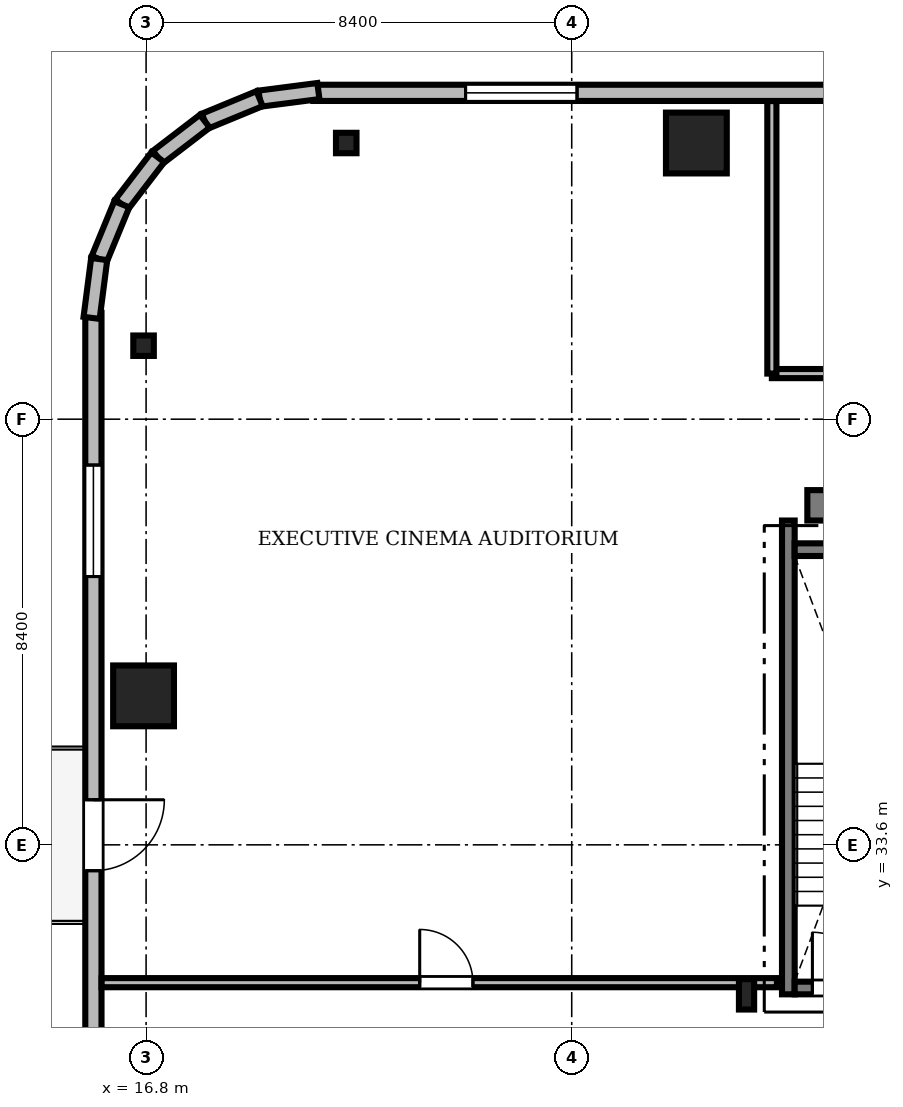
"""IFC4 building model, lengths in metres.
Left out: names, types, materials, properties, quantities, classifications, styles, units other than length and angle.
Written with IfcOpenShell. Run it as: python <this file> out.ifc"""

import sys

from ifc_helpers import new_model, si_unit, direction, frame, frame_2d, origin, origin_2d, place, context, subcontext, project, spatial, rectangle, i_section, extrude, source, transform, mapped, element, fill, save


model = new_model("IFC4")
c1 = context("Model", 3, precision=1e-05, world=origin(), true_north=direction((0.0, 1.0)))
c2 = subcontext(c1, "Body", "Model", "MODEL_VIEW")
j1 = project(units=[si_unit("LENGTHUNIT", "METRE"), si_unit("PLANEANGLEUNIT", "RADIAN")], contexts=[c1])
p1 = place(None, origin())
s1 = spatial("IfcSite", under=j1, at=p1, CompositionType="ELEMENT")
p2 = place(p1, origin())
s2 = spatial("IfcBuilding", under=s1, at=p2, CompositionType="ELEMENT")
p3 = place(p2, frame((0.0, 0.0, 246.65)))
s3 = spatial("IfcBuildingStorey", under=s2, at=p3, CompositionType="ELEMENT", Elevation=246.65)
m1 = source(origin(), c2, "Body", "SweptSolid", [
    extrude(rectangle(XDim=17.52, YDim=0.6, at=frame_2d((8.76, 0.0))), origin(), (0.0, 0.0, 1.0), 3.73),
])
p4 = place(p3, frame((29.85, 40.3, 0.0), z_axis=(0.0, 0.0, 1.0), x_axis=(1.0, 0.0, 0.0)))
e1 = element("IfcWall", 1, at=p4, inside=s3, PredefinedType="SHEAR", context=c2, shape_type="MappedRepresentation", body=[
    mapped(m1, transform((0.0, 0.0, 0.0), scale=1.0)),
])
m2 = source(origin(), c2, "Body", "SweptSolid", [
    extrude(i_section(OverallWidth=0.3, OverallDepth=0.6, WebThickness=0.015, FlangeThickness=0.03, FilletRadius=0.027, at=origin_2d()), origin(), (0.0, 0.0, 1.0), 3.73),
])
p5 = place(p3, frame((28.65, 30.65, 0.0), z_axis=(0.0, 0.0, 1.0), x_axis=(1.0, 0.0, 0.0)))
e2 = element("IfcColumn", 2, at=p5, inside=s3, PredefinedType="COLUMN", context=c2, shape_type="MappedRepresentation", body=[
    mapped(m2, transform((0.0, 0.0, 0.0), scale=1.0)),
])
m3 = source(origin(), c2, "Body", "SweptSolid", [
    extrude(rectangle(XDim=1.2, YDim=1.2, at=origin_2d()), origin(), (0.0, 0.0, 1.0), 3.73),
])
for number, where, z_axis, x_axis in (
    (3, (27.66, 47.45, 0.0), (0.0, 0.0, 1.0), (1.0, 0.0, 0.0)),
    (4, (16.75, 36.54, 0.0), (0.0, 0.0, 1.0), (1.0, 0.0, 0.0)),
):
    element("IfcColumn", number, at=place(p3, frame(where, z_axis=z_axis, x_axis=x_axis)), inside=s3, PredefinedType="COLUMN", context=c2, shape_type="MappedRepresentation", body=[
        mapped(m3, transform((0.0, 0.0, 0.0), scale=1.0)),
    ])
m4 = source(origin(), c2, "Body", "SweptSolid", [
    extrude(i_section(OverallWidth=0.405, OverallDepth=0.403, WebThickness=0.018, FlangeThickness=0.028, FilletRadius=0.015, at=origin_2d()), origin(), (0.0, 0.0, 1.0), 3.73),
])
for number, where, z_axis, x_axis in (
    (5, (20.75, 47.45, 0.0), (0.0, 0.0, 1.0), (1.0, 0.0, 0.0)),
    (6, (16.75, 43.45, 0.0), (0.0, 0.0, 1.0), (1.0, 0.0, 0.0)),
):
    element("IfcColumn", number, at=place(p3, frame(where, z_axis=z_axis, x_axis=x_axis)), inside=s3, PredefinedType="COLUMN", context=c2, shape_type="MappedRepresentation", body=[
        mapped(m4, transform((0.0, 0.0, 0.0), scale=1.0)),
    ])
m5 = source(origin(), c2, "Body", "SweptSolid", [
    extrude(rectangle(XDim=15.6, YDim=0.32, at=frame_2d((7.8, 0.0))), origin(), (0.0, 0.0, 1.0), 3.73),
])
p6 = place(p3, frame((35.7, 48.44, 0.0), z_axis=(0.0, 0.0, 1.0), x_axis=(-1.0, 0.0, 0.0)))
e7 = element("IfcWall", 7, at=p6, inside=s3, PredefinedType="SOLIDWALL", context=c2, shape_type="MappedRepresentation", body=[
    mapped(m5, transform((0.0, 0.0, 0.0), scale=1.0)),
])
m6 = source(origin(), c2, "Body", "SweptSolid", [
    extrude(rectangle(XDim=2.2, YDim=2.4, at=frame_2d((1.1, 1.2))), frame((0.0, 0.17, 0.0), z_axis=(0.0, -1.0, 0.0), x_axis=(1.0, 0.0, 0.0)), (0.0, 0.0, 1.0), 0.34),
])
p7 = place(p6, frame((10.395, 0.0, 0.72)))
e8 = element("IfcOpeningElement", 8, at=p7, cuts=e7, PredefinedType="OPENING", context=c2, shape_type="MappedRepresentation", body=[
    mapped(m6, transform((0.0, 0.0, 0.0), scale=1.0)),
])
m7 = source(origin(), c2, "Body", "SweptSolid", [
    extrude(rectangle(XDim=15.6, YDim=0.32, at=frame_2d((7.8, 0.0))), origin(), (0.0, 0.0, 1.0), 3.73),
])
p8 = place(p3, frame((15.76, 44.1, 0.0), z_axis=(0.0, 0.0, 1.0), x_axis=(0.0, -1.0, 0.0)))
e9 = element("IfcWall", 9, at=p8, inside=s3, PredefinedType="SOLIDWALL", context=c2, shape_type="MappedRepresentation", body=[
    mapped(m7, transform((0.0, 0.0, 0.0), scale=1.0)),
])
m8 = source(origin(), c2, "Body", "SweptSolid", [
    extrude(rectangle(XDim=1.4, YDim=2.3, at=frame_2d((0.7, 1.15))), frame((0.0, 0.17, 0.0), z_axis=(0.0, -1.0, 0.0), x_axis=(1.0, 0.0, 0.0)), (0.0, 0.0, 1.0), 0.34),
])
p9 = place(p8, frame((9.61, 0.0, 0.0)))
e10 = element("IfcOpeningElement", 10, at=p9, cuts=e9, PredefinedType="OPENING", context=c2, shape_type="MappedRepresentation", body=[
    mapped(m8, transform((0.0, 0.0, 0.0), scale=1.0)),
])
p10 = place(p8, frame((3.005, 0.0, 0.72)))
e11 = element("IfcOpeningElement", 11, at=p10, cuts=e9, PredefinedType="OPENING", context=c2, shape_type="MappedRepresentation", body=[
    mapped(m6, transform((0.0, 0.0, 0.0), scale=1.0)),
])
m9 = source(origin(), c2, "Body", "SweptSolid", [
    extrude(rectangle(XDim=1.17, YDim=0.32, at=frame_2d((0.585, 0.0))), origin(), (0.0, 0.0, 1.0), 3.73),
])
p11 = place(p3, frame((20.2, 48.476, 0.0), z_axis=(0.0, 0.0, 1.0), x_axis=(-0.991735963317, -0.128295670475, 0.0)))
e12 = element("IfcWall", 12, at=p11, inside=s3, PredefinedType="SOLIDWALL", context=c2, shape_type="MappedRepresentation", body=[
    mapped(m9, transform((0.0, 0.0, 0.0), scale=1.0)),
])
m10 = source(origin(), c2, "Body", "SweptSolid", [
    extrude(rectangle(XDim=1.169, YDim=0.32, at=frame_2d((0.584, 0.0))), origin(), (0.0, 0.0, 1.0), 3.73),
])
p12 = place(p3, frame((19.04, 48.325, 0.0), z_axis=(0.0, 0.0, 1.0), x_axis=(-0.924552646638, -0.381054331552, 0.0)))
e13 = element("IfcWall", 13, at=p12, inside=s3, PredefinedType="SOLIDWALL", context=c2, shape_type="MappedRepresentation", body=[
    mapped(m10, transform((0.0, 0.0, 0.0), scale=1.0)),
])
m11 = source(origin(), c2, "Body", "SweptSolid", [
    extrude(rectangle(XDim=1.169, YDim=0.32, at=frame_2d((0.584, 0.0))), origin(), (0.0, 0.0, 1.0), 3.73),
])
p13 = place(p3, frame((17.959, 47.88, 0.0), z_axis=(0.0, 0.0, 1.0), x_axis=(-0.793663520347, -0.608356981114, 0.0)))
e14 = element("IfcWall", 14, at=p13, inside=s3, PredefinedType="SOLIDWALL", context=c2, shape_type="MappedRepresentation", body=[
    mapped(m11, transform((0.0, 0.0, 0.0), scale=1.0)),
])
m12 = source(origin(), c2, "Body", "SweptSolid", [
    extrude(rectangle(XDim=1.169, YDim=0.32, at=frame_2d((0.584, 0.0))), origin(), (0.0, 0.0, 1.0), 3.73),
])
p14 = place(p3, frame((17.031, 47.169, 0.0), z_axis=(0.0, 0.0, 1.0), x_axis=(-0.608387696831, -0.793639975269, 0.0)))
e15 = element("IfcWall", 15, at=p14, inside=s3, PredefinedType="SOLIDWALL", context=c2, shape_type="MappedRepresentation", body=[
    mapped(m12, transform((0.0, 0.0, 0.0), scale=1.0)),
])
p15 = place(p3, frame((16.32, 46.241, 0.0), z_axis=(0.0, 0.0, 1.0), x_axis=(-0.381054331552, -0.924552646638, 0.0)))
e16 = element("IfcWall", 16, at=p15, inside=s3, PredefinedType="SOLIDWALL", context=c2, shape_type="MappedRepresentation", body=[
    mapped(m10, transform((0.0, 0.0, 0.0), scale=1.0)),
])
p16 = place(p3, frame((15.875, 45.16, 0.0), z_axis=(0.0, 0.0, 1.0), x_axis=(-0.128295670475, -0.991735963317, 0.0)))
e17 = element("IfcWall", 17, at=p16, inside=s3, PredefinedType="SOLIDWALL", context=c2, shape_type="MappedRepresentation", body=[
    mapped(m9, transform((0.0, 0.0, 0.0), scale=1.0)),
])
m13 = source(origin(), c2, "Body", "SweptSolid", [
    extrude(rectangle(XDim=9.35, YDim=0.25, at=frame_2d((4.675, 0.0))), origin(), (0.0, 0.0, 1.0), 3.75),
])
p17 = place(p3, frame((29.475, 30.65, 0.0), z_axis=(0.0, 0.0, 1.0), x_axis=(0.0, 1.0, 0.0)))
e18 = element("IfcWall", 18, at=p17, inside=s3, PredefinedType="SOLIDWALL", context=c2, shape_type="MappedRepresentation", body=[
    mapped(m13, transform((0.0, 0.0, 0.0), scale=1.0)),
])
m14 = source(origin(), c2, "Body", "SweptSolid", [
    extrude(rectangle(XDim=3.15, YDim=0.25, at=frame_2d((1.575, 0.0))), origin(), (0.0, 0.0, 1.0), 3.75),
])
p18 = place(p3, frame((29.6, 39.425, 0.0), z_axis=(0.0, 0.0, 1.0), x_axis=(1.0, 0.0, 0.0)))
e19 = element("IfcWall", 19, at=p18, inside=s3, PredefinedType="SOLIDWALL", context=c2, shape_type="MappedRepresentation", body=[
    mapped(m14, transform((0.0, 0.0, 0.0), scale=1.0)),
])
p19 = place(p3, frame((29.6, 30.775, 0.0), z_axis=(0.0, 0.0, 1.0), x_axis=(1.0, 0.0, 0.0)))
e20 = element("IfcWall", 20, at=p19, inside=s3, PredefinedType="SOLIDWALL", context=c2, shape_type="MappedRepresentation", body=[
    mapped(m14, transform((0.0, 0.0, 0.0), scale=1.0)),
])
m15 = source(origin(), c2, "Body", "SweptSolid", [
    extrude(rectangle(XDim=1.1, YDim=2.2, at=frame_2d((0.55, 1.1))), frame((0.0, 0.135, 0.0), z_axis=(0.0, -1.0, 0.0), x_axis=(1.0, 0.0, 0.0)), (0.0, 0.0, 1.0), 0.27),
])
p20 = place(p19, frame((0.35, 0.0, 0.0)))
e21 = element("IfcOpeningElement", 21, at=p20, cuts=e20, PredefinedType="OPENING", context=c2, shape_type="MappedRepresentation", body=[
    mapped(m15, transform((0.0, 0.0, 0.0), scale=1.0)),
])
m16 = source(origin(), c2, "Body", "SweptSolid", [
    extrude(rectangle(XDim=32.928, YDim=0.18, at=frame_2d((16.464, 0.0))), origin(), (0.0, 0.0, 1.0), 2.972),
])
p21 = place(p3, frame((29.15, 42.9, 0.0), z_axis=(0.0, 0.0, 1.0), x_axis=(1.0, 0.0, 0.0)))
e22 = element("IfcWall", 22, at=p21, inside=s3, PredefinedType="PARTITIONING", context=c2, shape_type="MappedRepresentation", body=[
    mapped(m16, transform((0.0, 0.0, 0.0), scale=1.0)),
])
m17 = source(origin(), c2, "Body", "SweptSolid", [
    extrude(rectangle(XDim=1.05, YDim=2.2, at=frame_2d((0.525, 1.1))), frame((0.0, 0.1, 0.0), z_axis=(0.0, -1.0, 0.0), x_axis=(1.0, 0.0, 0.0)), (0.0, 0.0, 1.0), 0.2),
])
p22 = place(p21, frame((4.5, 0.0, 0.0)))
e23 = element("IfcOpeningElement", 23, at=p22, cuts=e22, PredefinedType="OPENING", context=c2, shape_type="MappedRepresentation", body=[
    mapped(m17, transform((0.0, 0.0, 0.0), scale=1.0)),
])
m18 = source(origin(), c2, "Body", "SweptSolid", [
    extrude(rectangle(XDim=13.328, YDim=0.18, at=frame_2d((6.664, 0.0))), origin(), (0.0, 0.0, 1.0), 2.972),
])
p23 = place(p3, frame((15.922, 30.88, 0.0), z_axis=(0.0, 0.0, 1.0), x_axis=(1.0, 0.0, 0.0)))
e24 = element("IfcWall", 24, at=p23, inside=s3, PredefinedType="PARTITIONING", context=c2, shape_type="MappedRepresentation", body=[
    mapped(m18, transform((0.0, 0.0, 0.0), scale=1.0)),
])
p24 = place(p23, frame((6.278, 0.0, 0.0)))
e25 = element("IfcOpeningElement", 25, at=p24, cuts=e24, PredefinedType="OPENING", context=c2, shape_type="MappedRepresentation", body=[
    mapped(m17, transform((0.0, 0.0, 0.0), scale=1.0)),
])
m19 = source(origin(), c2, "Body", "SweptSolid", [
    extrude(rectangle(XDim=5.378, YDim=0.18, at=frame_2d((2.689, 0.0))), origin(), (0.0, 0.0, 1.0), 2.972),
])
p25 = place(p3, frame((29.15, 42.9, 0.0), z_axis=(0.0, 0.0, 1.0), x_axis=(0.0, 1.0, 0.0)))
e26 = element("IfcWall", 26, at=p25, inside=s3, PredefinedType="PARTITIONING", context=c2, shape_type="MappedRepresentation", body=[
    mapped(m19, transform((0.0, 0.0, 0.0), scale=1.0)),
])
m20 = source(origin(), c2, "Body", "SweptSolid", [
    extrude(rectangle(XDim=2.2, YDim=2.4, at=frame_2d((1.1, 1.2))), frame((0.0, 0.03, 0.0), z_axis=(0.0, -1.0, 0.0), x_axis=(1.0, 0.0, 0.0)), (0.0, 0.0, 1.0), 0.06),
])
p26 = place(p7, origin())
e27 = element("IfcWindow", 27, at=p26, inside=s3, PartitioningType="SINGLE_PANEL", PredefinedType="WINDOW", context=c2, shape_type="MappedRepresentation", body=[
    mapped(m20, transform((0.0, 0.0, 0.0), scale=1.0)),
])
fill(e8, e27)
m21 = source(origin(), c2, "Body", "SweptSolid", [
    extrude(rectangle(XDim=1.4, YDim=2.3, at=frame_2d((0.7, 1.15))), frame((0.0, 0.025, 0.0), z_axis=(0.0, -1.0, 0.0), x_axis=(1.0, 0.0, 0.0)), (0.0, 0.0, 1.0), 0.05),
])
p27 = place(p9, frame((1.4, 0.0, 0.0), z_axis=(0.0, 0.0, 1.0), x_axis=(-1.0, 0.0, 0.0)))
e28 = element("IfcDoor", 28, at=p27, inside=s3, OperationType="DOUBLE_DOOR_SLIDING", PredefinedType="DOOR", context=c2, shape_type="MappedRepresentation", body=[
    mapped(m21, transform((0.0, 0.0, 0.0), scale=1.0)),
])
fill(e10, e28)
p28 = place(p10, origin())
e29 = element("IfcWindow", 29, at=p28, inside=s3, PartitioningType="SINGLE_PANEL", PredefinedType="WINDOW", context=c2, shape_type="MappedRepresentation", body=[
    mapped(m20, transform((0.0, 0.0, 0.0), scale=1.0)),
])
fill(e11, e29)
m22 = source(origin(), c2, "Body", "SweptSolid", [
    extrude(rectangle(XDim=1.1, YDim=2.2, at=frame_2d((0.55, 1.1))), frame((0.0, 0.025, 0.0), z_axis=(0.0, -1.0, 0.0), x_axis=(1.0, 0.0, 0.0)), (0.0, 0.0, 1.0), 0.05),
])
p29 = place(p20, origin())
e30 = element("IfcDoor", 30, at=p29, inside=s3, OperationType="SINGLE_SWING_LEFT", PredefinedType="DOOR", context=c2, shape_type="MappedRepresentation", body=[
    mapped(m22, transform((0.0, 0.0, 0.0), scale=1.0)),
])
fill(e21, e30)
m23 = source(origin(), c2, "Body", "SweptSolid", [
    extrude(rectangle(XDim=1.05, YDim=2.2, at=frame_2d((0.525, 1.1))), frame((0.0, 0.025, 0.0), z_axis=(0.0, -1.0, 0.0), x_axis=(1.0, 0.0, 0.0)), (0.0, 0.0, 1.0), 0.05),
])
p30 = place(p24, origin())
e31 = element("IfcDoor", 31, at=p30, inside=s3, OperationType="SINGLE_SWING_LEFT", PredefinedType="DOOR", context=c2, shape_type="MappedRepresentation", body=[
    mapped(m23, transform((0.0, 0.0, 0.0), scale=1.0)),
])
fill(e25, e31)
save(model, sys.argv[1])
